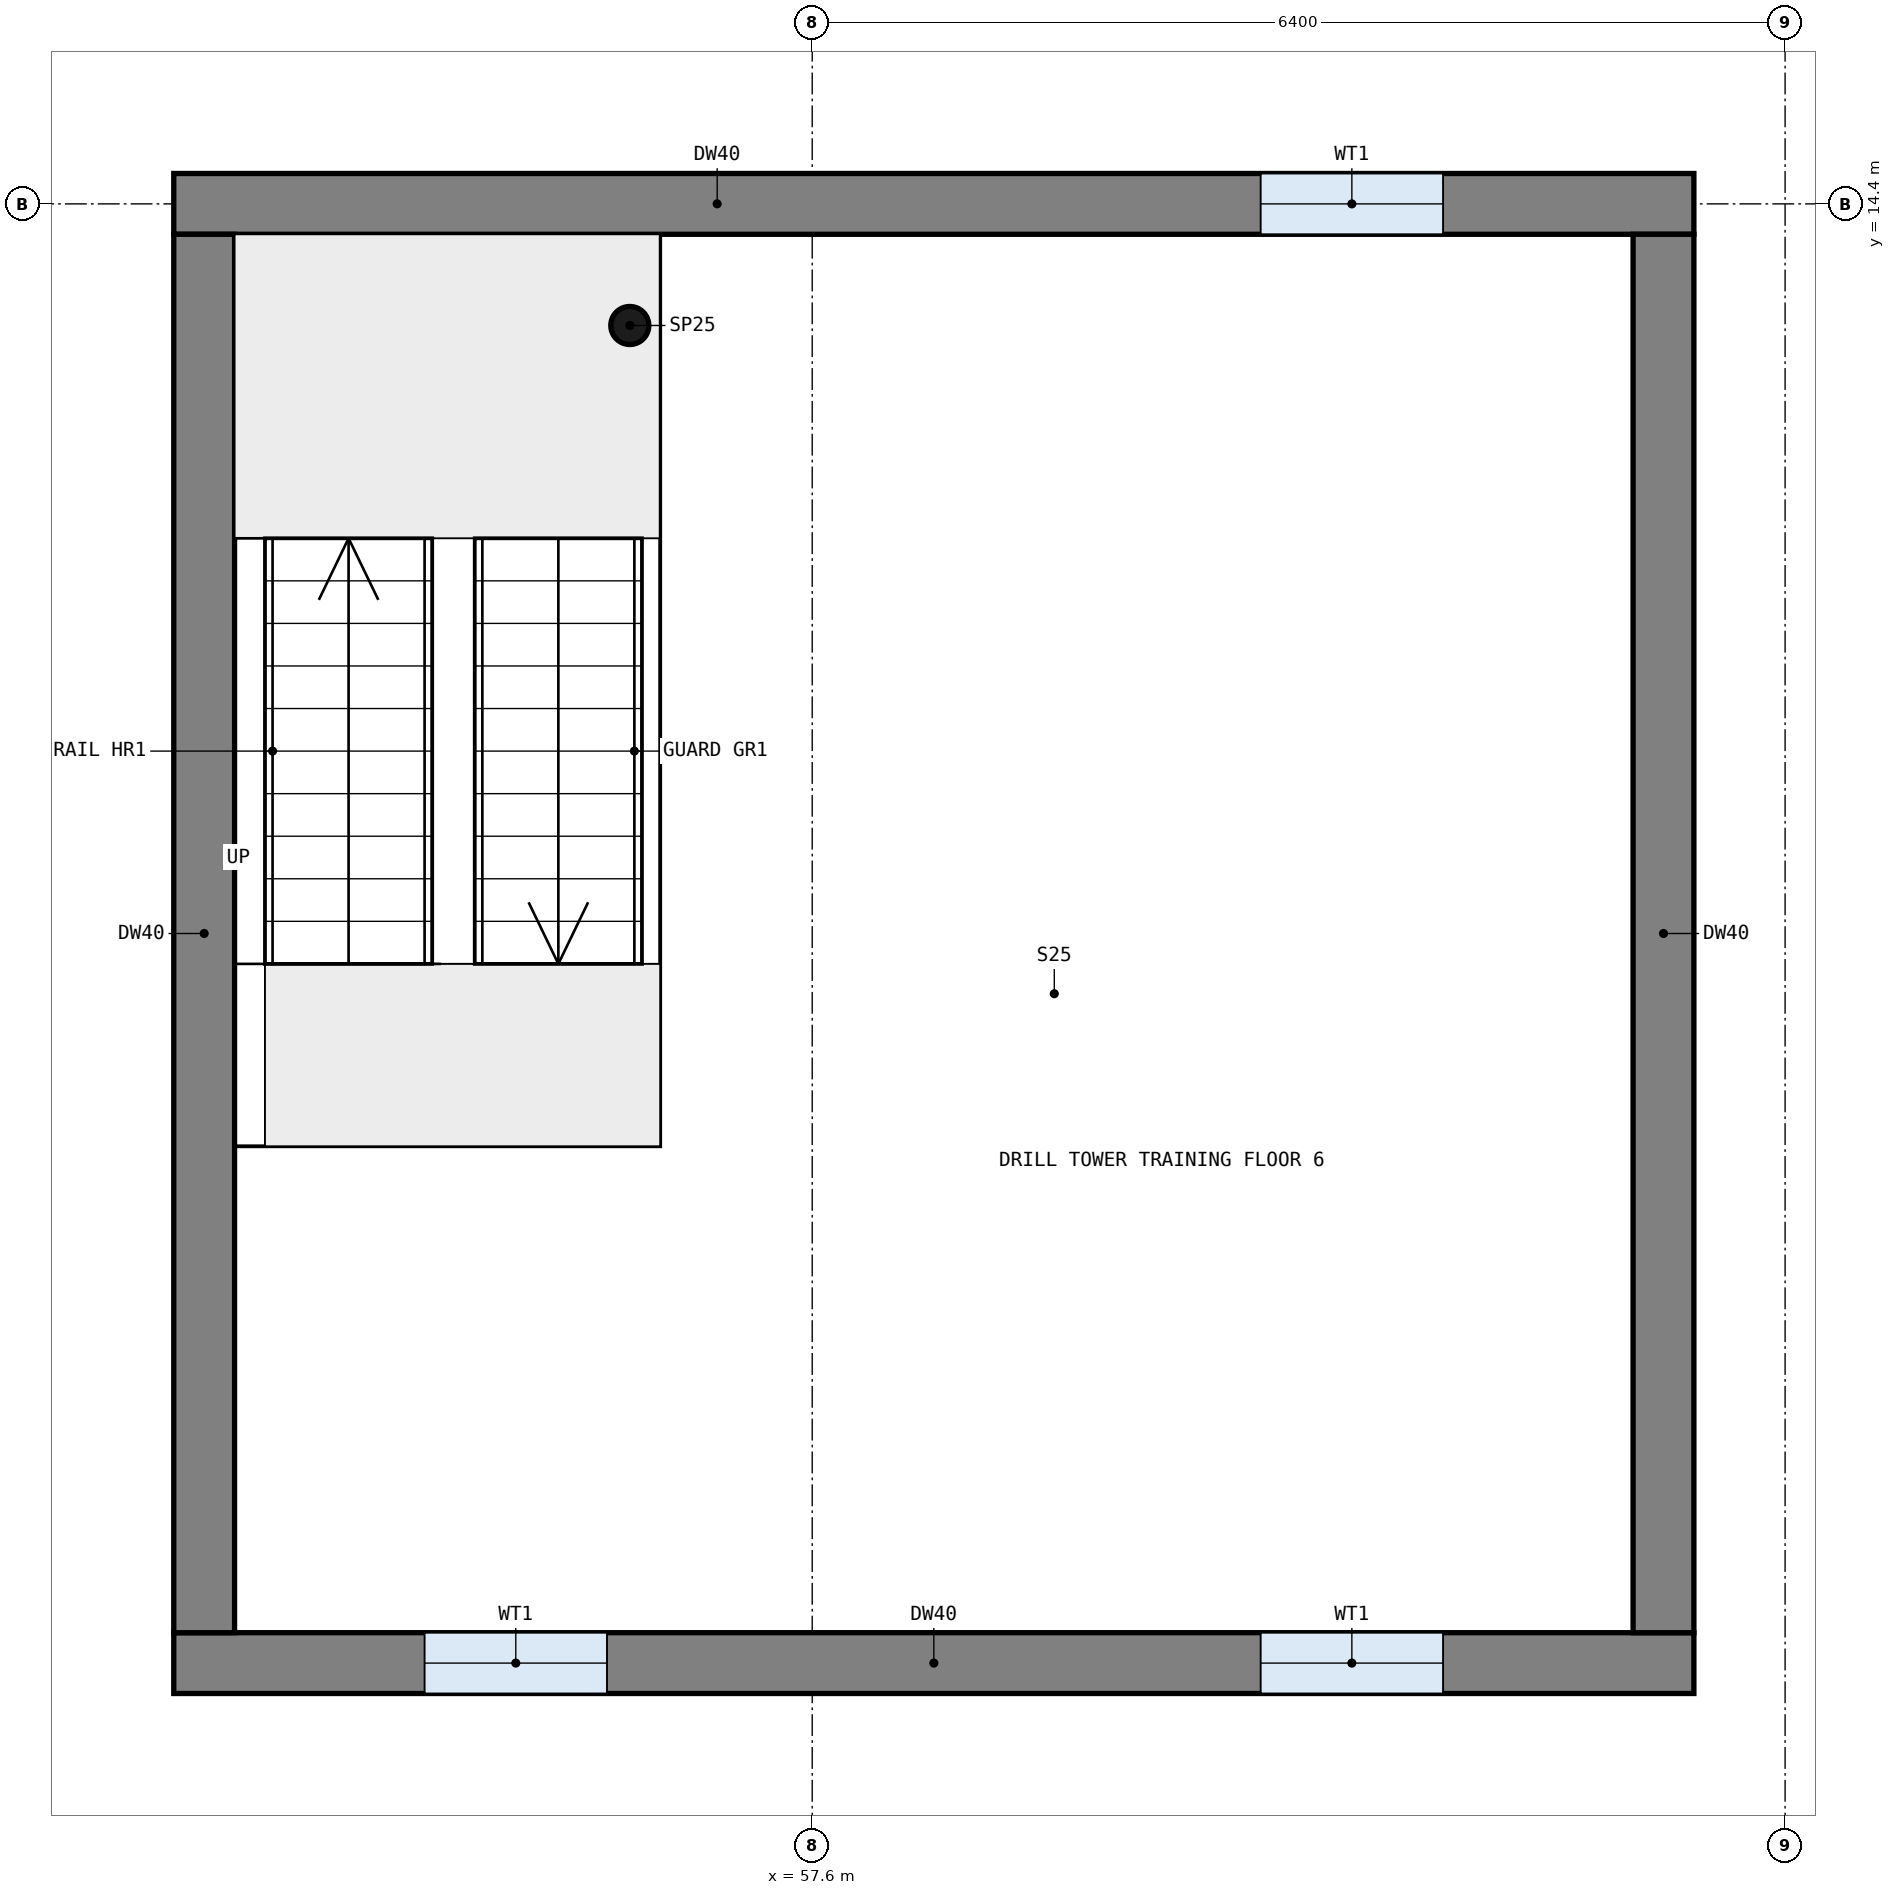
"""IFC4 building model, lengths in metres.
Left out: names, types, materials, properties, quantities, classifications, styles, units other than length and angle.
Written with IfcOpenShell. Run it as: python <this file> out.ifc"""

import sys

from ifc_helpers import new_model, si_unit, direction, frame, frame_2d, origin, origin_2d, place, context, subcontext, project, spatial, rectangle, circle, extrude, element, fill, save


model = new_model("IFC4")
c1 = context("Model", 3, precision=1e-05, world=origin(), true_north=direction((0.0, 1.0)))
c2 = subcontext(c1, "Body", "Model", "MODEL_VIEW")
j1 = project(units=[si_unit("LENGTHUNIT", "METRE"), si_unit("PLANEANGLEUNIT", "RADIAN")], contexts=[c1])
p1 = place(None, origin())
s1 = spatial("IfcSite", under=j1, at=p1, CompositionType="ELEMENT")
p2 = place(p1, origin())
s2 = spatial("IfcBuilding", under=s1, at=p2, CompositionType="ELEMENT")
p3 = place(p2, frame((0.0, 0.0, 21.0)))
s3 = spatial("IfcBuildingStorey", under=s2, at=p3, CompositionType="ELEMENT", Elevation=21.0)
p4 = place(p3, frame((53.4, 14.4, 0.0), z_axis=(0.0, 0.0, 1.0), x_axis=(1.0, 0.0, 0.0)))
e1 = element("IfcWall", 1, at=p4, inside=s3, PredefinedType="SHEAR", context=c2, shape_type="SweptSolid", body=[
    extrude(rectangle(XDim=10.0, YDim=0.4, at=frame_2d((5.0, 0.0))), origin(), (0.0, 0.0, 1.0), 3.9),
])
p5 = place(p4, frame((7.15, 0.0, 1.1)))
e2 = element("IfcOpeningElement", 2, at=p5, cuts=e1, PredefinedType="OPENING", context=c2, shape_type="SweptSolid", body=[
    extrude(rectangle(XDim=1.2, YDim=1.5, at=frame_2d((0.6, 0.75))), frame((0.0, 0.21, 0.0), z_axis=(0.0, -1.0, 0.0), x_axis=(1.0, 0.0, 0.0)), (0.0, 0.0, 1.0), 0.42),
])
p6 = place(p3, frame((53.4, 4.8, 0.0), z_axis=(0.0, 0.0, 1.0), x_axis=(1.0, 0.0, 0.0)))
e3 = element("IfcWall", 3, at=p6, inside=s3, PredefinedType="SHEAR", context=c2, shape_type="SweptSolid", body=[
    extrude(rectangle(XDim=10.0, YDim=0.4, at=frame_2d((5.0, 0.0))), origin(), (0.0, 0.0, 1.0), 3.9),
])
p7 = place(p6, frame((1.65, 0.0, 1.1)))
e4 = element("IfcOpeningElement", 4, at=p7, cuts=e3, PredefinedType="OPENING", context=c2, shape_type="SweptSolid", body=[
    extrude(rectangle(XDim=1.2, YDim=1.5, at=frame_2d((0.6, 0.75))), frame((0.0, 0.21, 0.0), z_axis=(0.0, -1.0, 0.0), x_axis=(1.0, 0.0, 0.0)), (0.0, 0.0, 1.0), 0.42),
])
p8 = place(p6, frame((7.15, 0.0, 1.1)))
e5 = element("IfcOpeningElement", 5, at=p8, cuts=e3, PredefinedType="OPENING", context=c2, shape_type="SweptSolid", body=[
    extrude(rectangle(XDim=1.2, YDim=1.5, at=frame_2d((0.6, 0.75))), frame((0.0, 0.21, 0.0), z_axis=(0.0, -1.0, 0.0), x_axis=(1.0, 0.0, 0.0)), (0.0, 0.0, 1.0), 0.42),
])
for number, where, z_axis, x_axis in (
    (6, (63.2, 5.0, 0.0), (0.0, 0.0, 1.0), (0.0, 1.0, 0.0)),
    (7, (53.6, 5.0, 0.0), (0.0, 0.0, 1.0), (0.0, 1.0, 0.0)),
):
    element("IfcWall", number, at=place(p3, frame(where, z_axis=z_axis, x_axis=x_axis)), inside=s3, PredefinedType="SHEAR", context=c2, shape_type="SweptSolid", body=[
        extrude(rectangle(XDim=9.2, YDim=0.4, at=frame_2d((4.6, 0.0))), origin(), (0.0, 0.0, 1.0), 3.9),
    ])
p9 = place(p3, frame((56.4, 13.6, 0.0), z_axis=(0.0, 0.0, 1.0), x_axis=(1.0, 0.0, 0.0)))
e8 = element("IfcColumn", 8, at=p9, inside=s3, PredefinedType="COLUMN", context=c2, shape_type="SweptSolid", body=[
    extrude(circle(Radius=0.125, at=origin_2d()), origin(), (0.0, 0.0, 1.0), 3.9),
])
p10 = place(p7, origin())
e9 = element("IfcWindow", 9, at=p10, inside=s3, PartitioningType="SINGLE_PANEL", PredefinedType="WINDOW", context=c2, shape_type="SweptSolid", body=[
    extrude(rectangle(XDim=1.2, YDim=1.5, at=frame_2d((0.6, 0.75))), frame((0.0, 0.03, 0.0), z_axis=(0.0, -1.0, 0.0), x_axis=(1.0, 0.0, 0.0)), (0.0, 0.0, 1.0), 0.06),
])
fill(e4, e9)
p11 = place(p8, origin())
e10 = element("IfcWindow", 10, at=p11, inside=s3, PartitioningType="SINGLE_PANEL", PredefinedType="WINDOW", context=c2, shape_type="SweptSolid", body=[
    extrude(rectangle(XDim=1.2, YDim=1.5, at=frame_2d((0.6, 0.75))), frame((0.0, 0.03, 0.0), z_axis=(0.0, -1.0, 0.0), x_axis=(1.0, 0.0, 0.0)), (0.0, 0.0, 1.0), 0.06),
])
fill(e5, e10)
p12 = place(p5, origin())
e11 = element("IfcWindow", 11, at=p12, inside=s3, PartitioningType="SINGLE_PANEL", PredefinedType="WINDOW", context=c2, shape_type="SweptSolid", body=[
    extrude(rectangle(XDim=1.2, YDim=1.5, at=frame_2d((0.6, 0.75))), frame((0.0, 0.03, 0.0), z_axis=(0.0, -1.0, 0.0), x_axis=(1.0, 0.0, 0.0)), (0.0, 0.0, 1.0), 0.06),
])
fill(e2, e11)
save(model, sys.argv[1])
